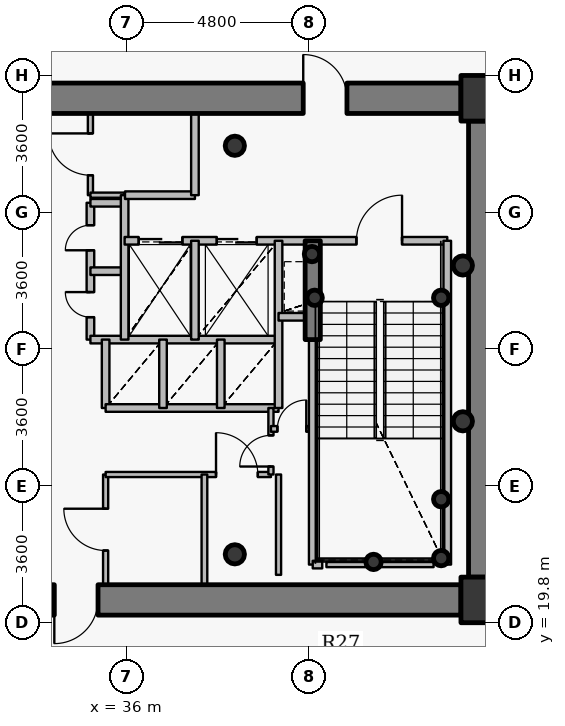
"""IFC4 building model, lengths in metres.
Left out: names, types, materials, properties, quantities, classifications, styles, units other than length and angle.
Written with IfcOpenShell. Run it as: python <this file> out.ifc"""

import sys

from ifc_helpers import new_model, si_unit, direction, frame, frame_2d, origin, origin_2d, place, context, subcontext, project, spatial, rectangle, hollow_circle, extrude, source, transform, mapped, element, fill, save


model = new_model("IFC4")
c1 = context("Model", 3, precision=1e-05, world=origin(), true_north=direction((0.0, 1.0)))
c2 = subcontext(c1, "Body", "Model", "MODEL_VIEW")
j1 = project(units=[si_unit("LENGTHUNIT", "METRE"), si_unit("PLANEANGLEUNIT", "RADIAN")], contexts=[c1])
p1 = place(None, origin())
s1 = spatial("IfcSite", under=j1, at=p1, CompositionType="ELEMENT")
p2 = place(p1, origin())
s2 = spatial("IfcBuilding", under=s1, at=p2, CompositionType="ELEMENT")
p3 = place(p2, frame((0.0, 0.0, 156.15)))
s3 = spatial("IfcBuildingStorey", under=s2, at=p3, CompositionType="ELEMENT", Elevation=156.15)
for number, where, z_axis, x_axis in (
    (1, (45.4, 20.4, 0.0), (0.0, 0.0, 1.0), (1.0, 0.0, 0.0)),
    (2, (45.4, 33.6, 0.0), (0.0, 0.0, 1.0), (1.0, 0.0, 0.0)),
):
    element("IfcColumn", number, at=place(p3, frame(where, z_axis=z_axis, x_axis=x_axis)), inside=s3, PredefinedType="COLUMN", context=c2, shape_type="SweptSolid", body=[
        extrude(rectangle(XDim=1.2, YDim=1.2, at=origin_2d()), origin(), (0.0, 0.0, 1.0), 3.75),
    ])
for number, where, z_axis, x_axis in (
    (3, (38.85, 21.6, 0.0), (0.0, 0.0, 1.0), (1.0, 0.0, 0.0)),
    (4, (38.85, 32.35, 0.0), (0.0, 0.0, 1.0), (1.0, 0.0, 0.0)),
):
    element("IfcColumn", number, at=place(p3, frame(where, z_axis=z_axis, x_axis=x_axis)), inside=s3, PredefinedType="COLUMN", context=c2, shape_type="SweptSolid", body=[
        extrude(hollow_circle(Radius=0.254, WallThickness=0.02, at=origin_2d()), origin(), (0.0, 0.0, 1.0), 3.75),
    ])
for number, where, z_axis, x_axis in (
    (5, (44.28, 21.5, 0.0), (0.0, 0.0, 1.0), (1.0, 0.0, 0.0)),
    (6, (44.28, 23.05, 0.0), (0.0, 0.0, 1.0), (1.0, 0.0, 0.0)),
    (7, (42.5, 21.4, 0.0), (0.0, 0.0, 1.0), (1.0, 0.0, 0.0)),
    (8, (40.95, 28.35, 0.0), (0.0, 0.0, 1.0), (1.0, 0.0, 0.0)),
    (9, (44.28, 28.35, 0.0), (0.0, 0.0, 1.0), (1.0, 0.0, 0.0)),
    (10, (40.88, 29.5, 0.0), (0.0, 0.0, 1.0), (1.0, 0.0, 0.0)),
):
    element("IfcColumn", number, at=place(p3, frame(where, z_axis=z_axis, x_axis=x_axis)), inside=s3, PredefinedType="COLUMN", context=c2, shape_type="SweptSolid", body=[
        extrude(hollow_circle(Radius=0.203, WallThickness=0.016, at=origin_2d()), origin(), (0.0, 0.0, 1.0), 3.75),
    ])
p4 = place(p3, frame((27.2, 33.6, 0.0), z_axis=(0.0, 0.0, 1.0), x_axis=(1.0, 0.0, 0.0)))
e11 = element("IfcWall", 11, at=p4, inside=s3, PredefinedType="SHEAR", context=c2, shape_type="SweptSolid", body=[
    extrude(rectangle(XDim=17.6, YDim=0.8, at=frame_2d((8.8, 0.0))), origin(), (0.0, 0.0, 1.0), 2.95),
])
p5 = place(p4, frame((13.45, 0.0, 0.0)))
e12 = element("IfcOpeningElement", 12, at=p5, cuts=e11, PredefinedType="OPENING", context=c2, shape_type="SweptSolid", body=[
    extrude(rectangle(XDim=1.15, YDim=2.15, at=origin_2d()), frame((0.575, 0.41, 1.075), z_axis=(0.0, -1.0, 0.0), x_axis=(1.0, 0.0, 0.0)), (0.0, 0.0, 1.0), 0.82),
])
p6 = place(p3, frame((45.4, 33.0, 0.0), z_axis=(0.0, 0.0, 1.0), x_axis=(0.0, -1.0, 0.0)))
e13 = element("IfcWall", 13, at=p6, inside=s3, PredefinedType="SHEAR", context=c2, shape_type="SweptSolid", body=[
    extrude(rectangle(XDim=12.0, YDim=0.8, at=frame_2d((6.0, 0.0))), origin(), (0.0, 0.0, 1.0), 2.95),
])
p7 = place(p3, frame((44.8, 20.4, 0.0), z_axis=(0.0, 0.0, 1.0), x_axis=(-1.0, 0.0, 0.0)))
e14 = element("IfcWall", 14, at=p7, inside=s3, PredefinedType="SHEAR", context=c2, shape_type="SweptSolid", body=[
    extrude(rectangle(XDim=17.6, YDim=0.8, at=frame_2d((8.8, 0.0))), origin(), (0.0, 0.0, 1.0), 2.95),
])
p8 = place(p7, frame((9.55, 0.0, 0.0)))
e15 = element("IfcOpeningElement", 15, at=p8, cuts=e14, PredefinedType="OPENING", context=c2, shape_type="SweptSolid", body=[
    extrude(rectangle(XDim=1.15, YDim=2.15, at=origin_2d()), frame((0.575, 0.41, 1.075), z_axis=(0.0, -1.0, 0.0), x_axis=(1.0, 0.0, 0.0)), (0.0, 0.0, 1.0), 0.82),
])
p9 = place(p3, frame((40.9, 27.25, 0.0), z_axis=(0.0, 0.0, 1.0), x_axis=(0.0, 1.0, 0.0)))
e16 = element("IfcWall", 16, at=p9, inside=s3, PredefinedType="SHEAR", context=c2, shape_type="SweptSolid", body=[
    extrude(rectangle(XDim=2.6, YDim=0.4, at=frame_2d((1.3, 0.0))), origin(), (0.0, 0.0, 1.0), 3.1),
])
for number, where, z_axis, x_axis in (
    (17, (44.85, 25.1, 0.0), (0.0, 0.0, 1.0), (1.0, 0.0, 0.0)),
    (18, (44.85, 29.2, 0.0), (0.0, 0.0, 1.0), (1.0, 0.0, 0.0)),
):
    element("IfcColumn", number, at=place(p3, frame(where, z_axis=z_axis, x_axis=x_axis)), inside=s3, PredefinedType="COLUMN", context=c2, shape_type="SweptSolid", body=[
        extrude(hollow_circle(Radius=0.254, WallThickness=0.02, at=origin_2d()), origin(), (0.0, 0.0, 1.0), 3.75),
    ])
p10 = place(p3, frame((35.05, 27.25, 0.0), z_axis=(0.0, 0.0, 1.0), x_axis=(0.0, 1.0, 0.0)))
e19 = element("IfcWall", 19, at=p10, inside=s3, PredefinedType="PARTITIONING", context=c2, shape_type="SweptSolid", body=[
    extrude(rectangle(XDim=3.6, YDim=0.2, at=frame_2d((1.8, 0.0))), origin(), (0.0, 0.0, 1.0), 3.5),
])
p11 = place(p10, frame((0.59, 0.0, 0.0)))
e20 = element("IfcOpeningElement", 20, at=p11, cuts=e19, PredefinedType="OPENING", context=c2, shape_type="SweptSolid", body=[
    extrude(rectangle(XDim=0.66, YDim=2.05, at=origin_2d()), frame((0.33, 0.11, 1.025), z_axis=(0.0, -1.0, 0.0), x_axis=(1.0, 0.0, 0.0)), (0.0, 0.0, 1.0), 0.22),
])
p12 = place(p10, frame((2.35, 0.0, 0.0)))
e21 = element("IfcOpeningElement", 21, at=p12, cuts=e19, PredefinedType="OPENING", context=c2, shape_type="SweptSolid", body=[
    extrude(rectangle(XDim=0.66, YDim=2.05, at=origin_2d()), frame((0.33, 0.11, 1.025), z_axis=(0.0, -1.0, 0.0), x_axis=(1.0, 0.0, 0.0)), (0.0, 0.0, 1.0), 0.22),
])
p13 = place(p3, frame((35.05, 27.25, 0.0), z_axis=(0.0, 0.0, 1.0), x_axis=(1.0, 0.0, 0.0)))
e22 = element("IfcWall", 22, at=p13, inside=s3, PredefinedType="PARTITIONING", context=c2, shape_type="SweptSolid", body=[
    extrude(rectangle(XDim=4.95, YDim=0.2, at=frame_2d((2.475, 0.0))), origin(), (0.0, 0.0, 1.0), 3.085),
])
for number, where, z_axis, x_axis in (
    (23, (35.05, 29.05, 0.0), (0.0, 0.0, 1.0), (1.0, 0.0, 0.0)),
    (24, (35.05, 30.85, 0.0), (0.0, 0.0, 1.0), (1.0, 0.0, 0.0)),
):
    element("IfcWall", number, at=place(p3, frame(where, z_axis=z_axis, x_axis=x_axis)), inside=s3, PredefinedType="PARTITIONING", context=c2, shape_type="SweptSolid", body=[
        extrude(rectangle(XDim=0.9, YDim=0.2, at=frame_2d((0.45, 0.0))), origin(), (0.0, 0.0, 1.0), 3.5),
    ])
p14 = place(p3, frame((35.05, 31.05, 0.0), z_axis=(0.0, 0.0, 1.0), x_axis=(0.0, 1.0, 0.0)))
e25 = element("IfcWall", 25, at=p14, inside=s3, PredefinedType="PARTITIONING", context=c2, shape_type="SweptSolid", body=[
    extrude(rectangle(XDim=2.15, YDim=0.135, at=frame_2d((1.075, 0.0))), origin(), (0.0, 0.0, 1.0), 3.085),
])
p15 = place(p14, frame((0.525, 0.0, 0.0)))
e26 = element("IfcOpeningElement", 26, at=p15, cuts=e25, PredefinedType="OPENING", context=c2, shape_type="SweptSolid", body=[
    extrude(rectangle(XDim=1.1, YDim=2.15, at=origin_2d()), frame((0.55, 0.078, 1.075), z_axis=(0.0, -1.0, 0.0), x_axis=(1.0, 0.0, 0.0)), (0.0, 0.0, 1.0), 0.155),
])
p16 = place(p3, frame((35.05, 31.05, 0.0), z_axis=(0.0, 0.0, 1.0), x_axis=(1.0, 0.0, 0.0)))
e27 = element("IfcWall", 27, at=p16, inside=s3, PredefinedType="PARTITIONING", context=c2, shape_type="SweptSolid", body=[
    extrude(rectangle(XDim=0.9, YDim=0.135, at=frame_2d((0.45, 0.0))), origin(), (0.0, 0.0, 1.0), 3.5),
])
p17 = place(p3, frame((35.45, 20.8, 0.0), z_axis=(0.0, 0.0, 1.0), x_axis=(0.0, 1.0, 0.0)))
e28 = element("IfcWall", 28, at=p17, inside=s3, PredefinedType="PARTITIONING", context=c2, shape_type="SweptSolid", body=[
    extrude(rectangle(XDim=2.9, YDim=0.135, at=frame_2d((1.45, 0.0))), origin(), (0.0, 0.0, 1.0), 3.085),
])
p18 = place(p17, frame((0.9, 0.0, 0.0)))
e29 = element("IfcOpeningElement", 29, at=p18, cuts=e28, PredefinedType="OPENING", context=c2, shape_type="SweptSolid", body=[
    extrude(rectangle(XDim=1.1, YDim=2.15, at=origin_2d()), frame((0.55, 0.078, 1.075), z_axis=(0.0, -1.0, 0.0), x_axis=(1.0, 0.0, 0.0)), (0.0, 0.0, 1.0), 0.155),
])
p19 = place(p3, frame((35.45, 23.7, 0.0), z_axis=(0.0, 0.0, 1.0), x_axis=(1.0, 0.0, 0.0)))
e30 = element("IfcWall", 30, at=p19, inside=s3, PredefinedType="PARTITIONING", context=c2, shape_type="SweptSolid", body=[
    extrude(rectangle(XDim=4.35, YDim=0.135, at=frame_2d((2.175, 0.0))), origin(), (0.0, 0.0, 1.0), 3.085),
])
p20 = place(p19, frame((2.905, 0.0, 0.0)))
e31 = element("IfcOpeningElement", 31, at=p20, cuts=e30, PredefinedType="OPENING", context=c2, shape_type="SweptSolid", body=[
    extrude(rectangle(XDim=1.1, YDim=2.15, at=origin_2d()), frame((0.55, 0.078, 1.075), z_axis=(0.0, -1.0, 0.0), x_axis=(1.0, 0.0, 0.0)), (0.0, 0.0, 1.0), 0.155),
])
p21 = place(p3, frame((35.45, 25.45, 0.0), z_axis=(0.0, 0.0, 1.0), x_axis=(0.0, 1.0, 0.0)))
e32 = element("IfcWall", 32, at=p21, inside=s3, PredefinedType="PARTITIONING", context=c2, shape_type="SweptSolid", body=[
    extrude(rectangle(XDim=1.8, YDim=0.2, at=frame_2d((0.9, 0.0))), origin(), (0.0, 0.0, 1.0), 3.5),
])
p22 = place(p3, frame((35.45, 25.45, 0.0), z_axis=(0.0, 0.0, 1.0), x_axis=(1.0, 0.0, 0.0)))
e33 = element("IfcWall", 33, at=p22, inside=s3, PredefinedType="PARTITIONING", context=c2, shape_type="SweptSolid", body=[
    extrude(rectangle(XDim=4.55, YDim=0.2, at=frame_2d((2.275, 0.0))), origin(), (0.0, 0.0, 1.0), 3.085),
])
p23 = place(p3, frame((35.95, 27.25, 0.0), z_axis=(0.0, 0.0, 1.0), x_axis=(0.0, 1.0, 0.0)))
e34 = element("IfcWall", 34, at=p23, inside=s3, PredefinedType="PARTITIONING", context=c2, shape_type="SweptSolid", body=[
    extrude(rectangle(XDim=3.8, YDim=0.2, at=frame_2d((1.9, 0.0))), origin(), (0.0, 0.0, 1.0), 3.5),
])
p24 = place(p3, frame((35.95, 29.85, 0.0), z_axis=(0.0, 0.0, 1.0), x_axis=(1.0, 0.0, 0.0)))
e35 = element("IfcWall", 35, at=p24, inside=s3, PredefinedType="PARTITIONING", context=c2, shape_type="SweptSolid", body=[
    extrude(rectangle(XDim=8.49, YDim=0.2, at=frame_2d((4.245, 0.0))), origin(), (0.0, 0.0, 1.0), 3.085),
])
p25 = place(p24, frame((6.1, 0.0, 0.0)))
e36 = element("IfcOpeningElement", 36, at=p25, cuts=e35, PredefinedType="OPENING", context=c2, shape_type="SweptSolid", body=[
    extrude(rectangle(XDim=1.2, YDim=2.15, at=origin_2d()), frame((0.6, 0.11, 1.075), z_axis=(0.0, -1.0, 0.0), x_axis=(1.0, 0.0, 0.0)), (0.0, 0.0, 1.0), 0.22),
])
p26 = place(p24, frame((0.37, 0.0, 0.0)))
e37 = element("IfcOpeningElement", 37, at=p26, cuts=e35, PredefinedType="OPENING", context=c2, shape_type="SweptSolid", body=[
    extrude(rectangle(XDim=1.15, YDim=2.15, at=origin_2d()), frame((0.575, 0.11, 1.075), z_axis=(0.0, -1.0, 0.0), x_axis=(1.0, 0.0, 0.0)), (0.0, 0.0, 1.0), 0.22),
])
p27 = place(p24, frame((2.425, 0.0, 0.0)))
e38 = element("IfcOpeningElement", 38, at=p27, cuts=e35, PredefinedType="OPENING", context=c2, shape_type="SweptSolid", body=[
    extrude(rectangle(XDim=1.05, YDim=2.15, at=origin_2d()), frame((0.525, 0.11, 1.075), z_axis=(0.0, -1.0, 0.0), x_axis=(1.0, 0.0, 0.0)), (0.0, 0.0, 1.0), 0.22),
])
p28 = place(p3, frame((35.96, 31.05, 0.0), z_axis=(0.0, 0.0, 1.0), x_axis=(1.0, 0.0, 0.0)))
e39 = element("IfcWall", 39, at=p28, inside=s3, PredefinedType="PARTITIONING", context=c2, shape_type="SweptSolid", body=[
    extrude(rectangle(XDim=1.84, YDim=0.2, at=frame_2d((0.92, 0.0))), origin(), (0.0, 0.0, 1.0), 3.5),
])
p29 = place(p3, frame((36.96, 25.45, 0.0), z_axis=(0.0, 0.0, 1.0), x_axis=(0.0, 1.0, 0.0)))
e40 = element("IfcWall", 40, at=p29, inside=s3, PredefinedType="PARTITIONING", context=c2, shape_type="SweptSolid", body=[
    extrude(rectangle(XDim=1.8, YDim=0.2, at=frame_2d((0.9, 0.0))), origin(), (0.0, 0.0, 1.0), 3.5),
])
p30 = place(p3, frame((37.8, 27.25, 0.0), z_axis=(0.0, 0.0, 1.0), x_axis=(0.0, 1.0, 0.0)))
e41 = element("IfcWall", 41, at=p30, inside=s3, PredefinedType="PARTITIONING", context=c2, shape_type="SweptSolid", body=[
    extrude(rectangle(XDim=2.6, YDim=0.2, at=frame_2d((1.3, 0.0))), origin(), (0.0, 0.0, 1.0), 3.5),
])
p31 = place(p3, frame((37.8, 31.05, 0.0), z_axis=(0.0, 0.0, 1.0), x_axis=(0.0, 1.0, 0.0)))
e42 = element("IfcWall", 42, at=p31, inside=s3, PredefinedType="PARTITIONING", context=c2, shape_type="SweptSolid", body=[
    extrude(rectangle(XDim=2.15, YDim=0.2, at=frame_2d((1.075, 0.0))), origin(), (0.0, 0.0, 1.0), 3.085),
])
p32 = place(p3, frame((38.05, 20.18, 0.0), z_axis=(0.0, 0.0, 1.0), x_axis=(0.0, 1.0, 0.0)))
e43 = element("IfcWall", 43, at=p32, inside=s3, PredefinedType="PARTITIONING", context=c2, shape_type="SweptSolid", body=[
    extrude(rectangle(XDim=3.52, YDim=0.15, at=frame_2d((1.76, 0.0))), origin(), (0.0, 0.0, 1.0), 2.935),
])
p33 = place(p3, frame((38.48, 25.45, 0.0), z_axis=(0.0, 0.0, 1.0), x_axis=(0.0, 1.0, 0.0)))
e44 = element("IfcWall", 44, at=p33, inside=s3, PredefinedType="PARTITIONING", context=c2, shape_type="SweptSolid", body=[
    extrude(rectangle(XDim=1.8, YDim=0.2, at=frame_2d((0.9, 0.0))), origin(), (0.0, 0.0, 1.0), 3.5),
])
p34 = place(p3, frame((39.8, 23.7, 0.0), z_axis=(0.0, 0.0, 1.0), x_axis=(0.0, 1.0, 0.0)))
e45 = element("IfcWall", 45, at=p34, inside=s3, PredefinedType="PARTITIONING", context=c2, shape_type="SweptSolid", body=[
    extrude(rectangle(XDim=1.75, YDim=0.135, at=frame_2d((0.875, 0.0))), origin(), (0.0, 0.0, 1.0), 3.5),
])
p35 = place(p34, frame((0.21, 0.0, 0.0)))
e46 = element("IfcOpeningElement", 46, at=p35, cuts=e45, PredefinedType="OPENING", context=c2, shape_type="SweptSolid", body=[
    extrude(rectangle(XDim=0.82, YDim=2.1, at=origin_2d()), frame((0.41, 0.078, 1.05), z_axis=(0.0, -1.0, 0.0), x_axis=(1.0, 0.0, 0.0)), (0.0, 0.0, 1.0), 0.155),
])
p36 = place(p3, frame((39.8, 24.9, 0.0), z_axis=(0.0, 0.0, 1.0), x_axis=(1.0, 0.0, 0.0)))
e47 = element("IfcWall", 47, at=p36, inside=s3, PredefinedType="PARTITIONING", context=c2, shape_type="SweptSolid", body=[
    extrude(rectangle(XDim=1.1, YDim=0.15, at=frame_2d((0.55, 0.0))), origin(), (0.0, 0.0, 1.0), 3.5),
])
p37 = place(p36, frame((0.17, 0.0, 0.0)))
e48 = element("IfcOpeningElement", 48, at=p37, cuts=e47, PredefinedType="OPENING", context=c2, shape_type="SweptSolid", body=[
    extrude(rectangle(XDim=0.76, YDim=2.1, at=origin_2d()), frame((0.38, 0.085, 1.05), z_axis=(0.0, -1.0, 0.0), x_axis=(1.0, 0.0, 0.0)), (0.0, 0.0, 1.0), 0.17),
])
p38 = place(p3, frame((40.0, 25.45, 0.0), z_axis=(0.0, 0.0, 1.0), x_axis=(0.0, 1.0, 0.0)))
e49 = element("IfcWall", 49, at=p38, inside=s3, PredefinedType="PARTITIONING", context=c2, shape_type="SweptSolid", body=[
    extrude(rectangle(XDim=4.4, YDim=0.2, at=frame_2d((2.2, 0.0))), origin(), (0.0, 0.0, 1.0), 3.5),
])
p39 = place(p3, frame((40.0, 27.85, 0.0), z_axis=(0.0, 0.0, 1.0), x_axis=(1.0, 0.0, 0.0)))
e50 = element("IfcWall", 50, at=p39, inside=s3, PredefinedType="PARTITIONING", context=c2, shape_type="SweptSolid", body=[
    extrude(rectangle(XDim=0.9, YDim=0.2, at=frame_2d((0.45, 0.0))), origin(), (0.0, 0.0, 1.0), 3.5),
])
p40 = place(p3, frame((40.9, 21.33, 0.0), z_axis=(0.0, 0.0, 1.0), x_axis=(0.0, 1.0, 0.0)))
e51 = element("IfcWall", 51, at=p40, inside=s3, PredefinedType="PARTITIONING", context=c2, shape_type="SweptSolid", body=[
    extrude(rectangle(XDim=5.91, YDim=0.2, at=frame_2d((2.955, 0.0))), origin(), (0.0, 0.0, 1.0), 3.035),
])
p41 = place(p3, frame((40.9, 21.33, 0.0), z_axis=(0.0, 0.0, 1.0), x_axis=(1.0, 0.0, 0.0)))
e52 = element("IfcWall", 52, at=p41, inside=s3, PredefinedType="PARTITIONING", context=c2, shape_type="SweptSolid", body=[
    extrude(rectangle(XDim=0.25, YDim=0.2, at=frame_2d((0.125, 0.0))), origin(), (0.0, 0.0, 1.0), 3.035),
])
p42 = place(p3, frame((44.44, 21.33, 0.0), z_axis=(0.0, 0.0, 1.0), x_axis=(0.0, 1.0, 0.0)))
e53 = element("IfcWall", 53, at=p42, inside=s3, PredefinedType="PARTITIONING", context=c2, shape_type="SweptSolid", body=[
    extrude(rectangle(XDim=8.52, YDim=0.2, at=frame_2d((4.26, 0.0))), origin(), (0.0, 0.0, 1.0), 3.5),
])
p43 = place(p3, frame((44.08, 21.33, 0.0), z_axis=(0.0, 0.0, 1.0), x_axis=(-1.0, 0.0, 0.0)))
e54 = element("IfcWall", 54, at=p43, inside=s3, PredefinedType="PARTITIONING", context=c2, shape_type="SweptSolid", body=[
    extrude(rectangle(XDim=2.82, YDim=0.135, at=frame_2d((1.41, 0.0))), origin(), (0.0, 0.0, 1.0), 3.035),
])
p44 = place(p3, frame((40.0, 23.7, 0.0), z_axis=(0.0, 0.0, 1.0), x_axis=(0.0, -1.0, 0.0)))
e55 = element("IfcWall", 55, at=p44, inside=s3, PredefinedType="PARTITIONING", context=c2, shape_type="SweptSolid", body=[
    extrude(rectangle(XDim=2.64, YDim=0.135, at=frame_2d((1.32, 0.0))), origin(), (0.0, 0.0, 1.0), 3.035),
])
for number, where, z_axis, x_axis in (
    (56, (45.8, 34.0, 0.0), (0.0, 0.0, 1.0), (-1.0, 0.0, 0.0)),
    (57, (44.81, 20.0, 0.0), (0.0, 0.0, 1.0), (1.0, 0.0, 0.0)),
):
    element("IfcWall", number, at=place(p3, frame(where, z_axis=z_axis, x_axis=x_axis)), inside=s3, PredefinedType="PARTITIONING", context=c2, shape_type="SweptSolid", body=[
        extrude(rectangle(XDim=0.99, YDim=0.135, at=frame_2d((0.495, 0.0))), origin(), (0.0, 0.0, 1.0), 2.935),
    ])
m1 = source(origin(), c2, "Body", "SweptSolid", [
    extrude(rectangle(XDim=1.15, YDim=2.15, at=origin_2d()), frame((0.575, 0.025, 1.075), z_axis=(0.0, -1.0, 0.0), x_axis=(1.0, 0.0, 0.0)), (0.0, 0.0, 1.0), 0.05),
])
p45 = place(p5, origin())
e58 = element("IfcDoor", 58, at=p45, inside=s3, OperationType="SINGLE_SWING_LEFT", PredefinedType="DOOR", context=c2, shape_type="MappedRepresentation", body=[
    mapped(m1, transform((0.0, 0.0, 0.0), x_axis=(1.0, 0.0, 0.0), y_axis=(0.0, 1.0, 0.0), z_axis=(0.0, 0.0, 1.0), scale=1.0)),
])
fill(e12, e58)
p46 = place(p8, origin())
e59 = element("IfcDoor", 59, at=p46, inside=s3, OperationType="SINGLE_SWING_RIGHT", PredefinedType="DOOR", context=c2, shape_type="MappedRepresentation", body=[
    mapped(m1, transform((0.0, 0.0, 0.0), x_axis=(1.0, 0.0, 0.0), y_axis=(0.0, 1.0, 0.0), z_axis=(0.0, 0.0, 1.0), scale=1.0)),
])
fill(e15, e59)
m2 = source(origin(), c2, "Body", "SweptSolid", [
    extrude(rectangle(XDim=1.2, YDim=2.15, at=origin_2d()), frame((0.6, 0.025, 1.075), z_axis=(0.0, -1.0, 0.0), x_axis=(1.0, 0.0, 0.0)), (0.0, 0.0, 1.0), 0.05),
])
p47 = place(p25, origin())
e60 = element("IfcDoor", 60, at=p47, inside=s3, OperationType="SINGLE_SWING_RIGHT", PredefinedType="DOOR", context=c2, shape_type="MappedRepresentation", body=[
    mapped(m2, transform((0.0, 0.0, 0.0), x_axis=(1.0, 0.0, 0.0), y_axis=(0.0, 1.0, 0.0), z_axis=(0.0, 0.0, 1.0), scale=1.0)),
])
fill(e36, e60)
m3 = source(origin(), c2, "Body", "SweptSolid", [
    extrude(rectangle(XDim=1.15, YDim=2.15, at=origin_2d()), frame((0.575, 0.025, 1.075), z_axis=(0.0, -1.0, 0.0), x_axis=(1.0, 0.0, 0.0)), (0.0, 0.0, 1.0), 0.05),
])
p48 = place(p26, origin())
e61 = element("IfcDoor", 61, at=p48, inside=s3, OperationType="DOUBLE_DOOR_SLIDING", PredefinedType="USERDEFINED", context=c2, shape_type="MappedRepresentation", body=[
    mapped(m3, transform((0.0, 0.0, 0.0), x_axis=(1.0, 0.0, 0.0), y_axis=(0.0, 1.0, 0.0), z_axis=(0.0, 0.0, 1.0), scale=1.0)),
])
fill(e37, e61)
m4 = source(origin(), c2, "Body", "SweptSolid", [
    extrude(rectangle(XDim=1.05, YDim=2.15, at=origin_2d()), frame((0.525, 0.025, 1.075), z_axis=(0.0, -1.0, 0.0), x_axis=(1.0, 0.0, 0.0)), (0.0, 0.0, 1.0), 0.05),
])
p49 = place(p27, origin())
e62 = element("IfcDoor", 62, at=p49, inside=s3, OperationType="DOUBLE_DOOR_SLIDING", PredefinedType="USERDEFINED", context=c2, shape_type="MappedRepresentation", body=[
    mapped(m4, transform((0.0, 0.0, 0.0), x_axis=(1.0, 0.0, 0.0), y_axis=(0.0, 1.0, 0.0), z_axis=(0.0, 0.0, 1.0), scale=1.0)),
])
fill(e38, e62)
m5 = source(origin(), c2, "Body", "SweptSolid", [
    extrude(rectangle(XDim=0.66, YDim=2.05, at=origin_2d()), frame((0.33, 0.025, 1.025), z_axis=(0.0, -1.0, 0.0), x_axis=(1.0, 0.0, 0.0)), (0.0, 0.0, 1.0), 0.05),
])
p50 = place(p11, origin())
e63 = element("IfcDoor", 63, at=p50, inside=s3, OperationType="SINGLE_SWING_RIGHT", PredefinedType="USERDEFINED", context=c2, shape_type="MappedRepresentation", body=[
    mapped(m5, transform((0.0, 0.0, 0.0), x_axis=(1.0, 0.0, 0.0), y_axis=(0.0, 1.0, 0.0), z_axis=(0.0, 0.0, 1.0), scale=1.0)),
])
fill(e20, e63)
p51 = place(p12, origin())
e64 = element("IfcDoor", 64, at=p51, inside=s3, OperationType="SINGLE_SWING_LEFT", PredefinedType="USERDEFINED", context=c2, shape_type="MappedRepresentation", body=[
    mapped(m5, transform((0.0, 0.0, 0.0), x_axis=(1.0, 0.0, 0.0), y_axis=(0.0, 1.0, 0.0), z_axis=(0.0, 0.0, 1.0), scale=1.0)),
])
fill(e21, e64)
m6 = source(origin(), c2, "Body", "SweptSolid", [
    extrude(rectangle(XDim=1.1, YDim=2.15, at=origin_2d()), frame((0.55, 0.025, 1.075), z_axis=(0.0, -1.0, 0.0), x_axis=(1.0, 0.0, 0.0)), (0.0, 0.0, 1.0), 0.05),
])
p52 = place(p18, origin())
e65 = element("IfcDoor", 65, at=p52, inside=s3, OperationType="SINGLE_SWING_RIGHT", PredefinedType="DOOR", context=c2, shape_type="MappedRepresentation", body=[
    mapped(m6, transform((0.0, 0.0, 0.0), x_axis=(1.0, 0.0, 0.0), y_axis=(0.0, 1.0, 0.0), z_axis=(0.0, 0.0, 1.0), scale=1.0)),
])
fill(e29, e65)
p53 = place(p20, origin())
e66 = element("IfcDoor", 66, at=p53, inside=s3, OperationType="SINGLE_SWING_LEFT", PredefinedType="DOOR", context=c2, shape_type="MappedRepresentation", body=[
    mapped(m6, transform((0.0, 0.0, 0.0), x_axis=(1.0, 0.0, 0.0), y_axis=(0.0, 1.0, 0.0), z_axis=(0.0, 0.0, 1.0), scale=1.0)),
])
fill(e31, e66)
p54 = place(p15, origin())
e67 = element("IfcDoor", 67, at=p54, inside=s3, OperationType="SINGLE_SWING_RIGHT", PredefinedType="DOOR", context=c2, shape_type="MappedRepresentation", body=[
    mapped(m6, transform((0.0, 0.0, 0.0), x_axis=(1.0, 0.0, 0.0), y_axis=(0.0, 1.0, 0.0), z_axis=(0.0, 0.0, 1.0), scale=1.0)),
])
fill(e26, e67)
m7 = source(origin(), c2, "Body", "SweptSolid", [
    extrude(rectangle(XDim=0.82, YDim=2.1, at=origin_2d()), frame((0.41, 0.025, 1.05), z_axis=(0.0, -1.0, 0.0), x_axis=(1.0, 0.0, 0.0)), (0.0, 0.0, 1.0), 0.05),
])
p55 = place(p35, origin())
e68 = element("IfcDoor", 68, at=p55, inside=s3, OperationType="SINGLE_SWING_LEFT", PredefinedType="DOOR", context=c2, shape_type="MappedRepresentation", body=[
    mapped(m7, transform((0.0, 0.0, 0.0), x_axis=(1.0, 0.0, 0.0), y_axis=(0.0, 1.0, 0.0), z_axis=(0.0, 0.0, 1.0), scale=1.0)),
])
fill(e46, e68)
m8 = source(origin(), c2, "Body", "SweptSolid", [
    extrude(rectangle(XDim=0.76, YDim=2.1, at=origin_2d()), frame((0.38, 0.025, 1.05), z_axis=(0.0, -1.0, 0.0), x_axis=(1.0, 0.0, 0.0)), (0.0, 0.0, 1.0), 0.05),
])
p56 = place(p37, origin())
e69 = element("IfcDoor", 69, at=p56, inside=s3, OperationType="SINGLE_SWING_RIGHT", PredefinedType="DOOR", context=c2, shape_type="MappedRepresentation", body=[
    mapped(m8, transform((0.0, 0.0, 0.0), x_axis=(1.0, 0.0, 0.0), y_axis=(0.0, 1.0, 0.0), z_axis=(0.0, 0.0, 1.0), scale=1.0)),
])
fill(e48, e69)
save(model, sys.argv[1])
